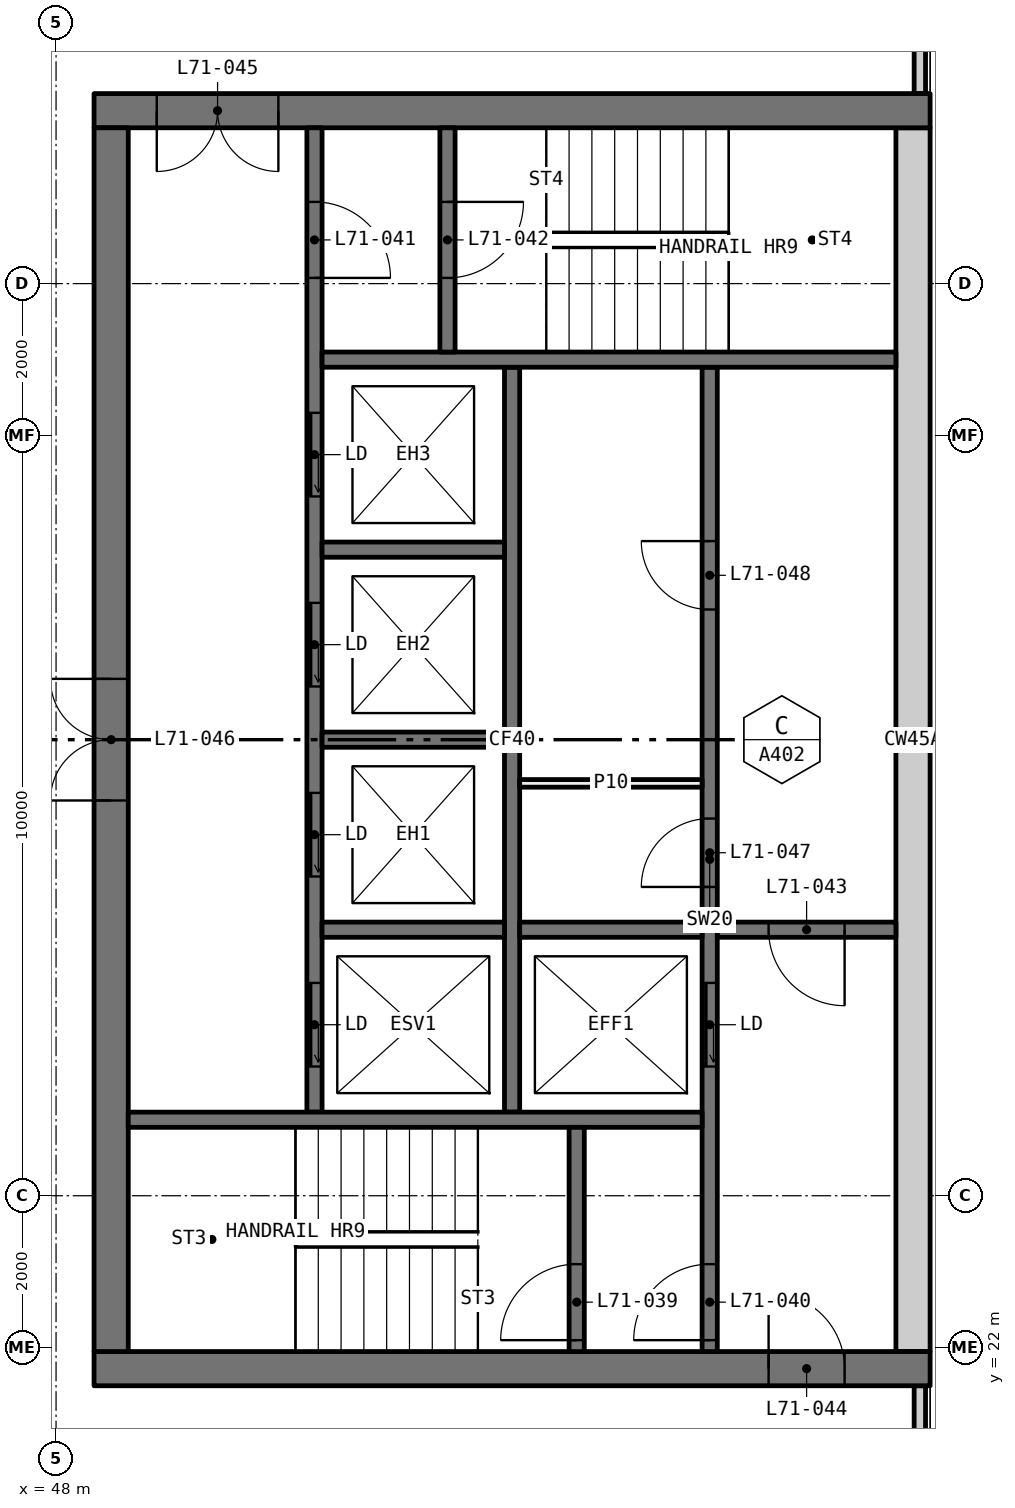
"""IFC4 building model, lengths in metres.
Left out: names, types, materials, properties, quantities, classifications, styles, units other than length and angle.
Written with IfcOpenShell. Run it as: python <this file> out.ifc"""

import sys

from ifc_helpers import new_model, si_unit, direction, frame, frame_2d, origin, place, context, subcontext, project, spatial, rectangle, extrude, element, fill, save


model = new_model("IFC4")
c1 = context("Model", 3, precision=1e-05, world=origin(), true_north=direction((0.0, 1.0)))
c2 = subcontext(c1, "Body", "Model", "MODEL_VIEW")
j1 = project(units=[si_unit("LENGTHUNIT", "METRE"), si_unit("PLANEANGLEUNIT", "RADIAN")], contexts=[c1])
p1 = place(None, origin())
s1 = spatial("IfcSite", under=j1, at=p1, CompositionType="ELEMENT")
p2 = place(p1, origin())
s2 = spatial("IfcBuilding", under=s1, at=p2, CompositionType="ELEMENT")
p3 = place(p2, frame((0.0, 0.0, 262.8)))
s3 = spatial("IfcBuildingStorey", under=s2, at=p3, CompositionType="ELEMENT", Elevation=262.8)
for number, where, z_axis, x_axis in (
    (1, (59.365, 18.71, 0.0), (0.0, 0.0, 1.0), (0.0, 1.0, 0.0)),
    (2, (59.365, 38.5, 0.0), (0.0, 0.0, 1.0), (0.0, 1.0, 0.0)),
):
    element("IfcWall", number, at=place(p3, frame(where, z_axis=z_axis, x_axis=x_axis)), inside=s3, PredefinedType="ELEMENTEDWALL", context=c2, shape_type="SweptSolid", body=[
        extrude(rectangle(XDim=2.79, YDim=0.15, at=frame_2d((1.395, 0.0))), origin(), (0.0, 0.0, 1.0), 3.05),
    ])
p4 = place(p3, frame((59.5, 21.725, 0.0), z_axis=(0.0, 0.0, 1.0), x_axis=(-1.0, 0.0, 0.0)))
e3 = element("IfcWall", 3, at=p4, inside=s3, PredefinedType="SHEAR", context=c2, shape_type="SweptSolid", body=[
    extrude(rectangle(XDim=11.0, YDim=0.45, at=frame_2d((5.5, 0.0))), origin(), (0.0, 0.0, 1.0), 3.05),
])
p5 = place(p4, frame((1.125, 0.0, 0.0)))
e4 = element("IfcOpeningElement", 4, at=p5, cuts=e3, PredefinedType="OPENING", context=c2, shape_type="SweptSolid", body=[
    extrude(rectangle(XDim=1.0, YDim=2.1, at=frame_2d((0.5, 1.05))), frame((0.0, 0.235, 0.0), z_axis=(0.0, -1.0, 0.0), x_axis=(1.0, 0.0, 0.0)), (0.0, 0.0, 1.0), 0.47),
])
p6 = place(p3, frame((59.5, 38.275, 0.0), z_axis=(0.0, 0.0, 1.0), x_axis=(-1.0, 0.0, 0.0)))
e5 = element("IfcWall", 5, at=p6, inside=s3, PredefinedType="SHEAR", context=c2, shape_type="SweptSolid", body=[
    extrude(rectangle(XDim=11.0, YDim=0.45, at=frame_2d((5.5, 0.0))), origin(), (0.0, 0.0, 1.0), 3.05),
])
p7 = place(p6, frame((8.575, 0.0, 0.0)))
e6 = element("IfcOpeningElement", 6, at=p7, cuts=e5, PredefinedType="OPENING", context=c2, shape_type="SweptSolid", body=[
    extrude(rectangle(XDim=1.6, YDim=2.1, at=frame_2d((0.8, 1.05))), frame((0.0, 0.235, 0.0), z_axis=(0.0, -1.0, 0.0), x_axis=(1.0, 0.0, 0.0)), (0.0, 0.0, 1.0), 0.47),
])
p8 = place(p3, frame((59.275, 21.95, 0.0), z_axis=(0.0, 0.0, 1.0), x_axis=(0.0, 1.0, 0.0)))
e7 = element("IfcWall", 7, at=p8, inside=s3, PredefinedType="SHEAR", context=c2, shape_type="SweptSolid", body=[
    extrude(rectangle(XDim=16.1, YDim=0.45, at=frame_2d((8.05, 0.0))), origin(), (0.0, 0.0, 1.0), 3.05),
])
p9 = place(p3, frame((48.725, 21.95, 0.0), z_axis=(0.0, 0.0, 1.0), x_axis=(0.0, 1.0, 0.0)))
e8 = element("IfcWall", 8, at=p9, inside=s3, PredefinedType="SHEAR", context=c2, shape_type="SweptSolid", body=[
    extrude(rectangle(XDim=16.1, YDim=0.45, at=frame_2d((8.05, 0.0))), origin(), (0.0, 0.0, 1.0), 3.05),
])
p10 = place(p9, frame((7.25, 0.0, 0.0)))
e9 = element("IfcOpeningElement", 9, at=p10, cuts=e8, PredefinedType="OPENING", context=c2, shape_type="SweptSolid", body=[
    extrude(rectangle(XDim=1.6, YDim=2.1, at=frame_2d((0.8, 1.05))), frame((0.0, 0.235, 0.0), z_axis=(0.0, -1.0, 0.0), x_axis=(1.0, 0.0, 0.0)), (0.0, 0.0, 1.0), 0.47),
])
p11 = place(p3, frame((56.6, 21.95, 0.0), z_axis=(0.0, 0.0, 1.0), x_axis=(0.0, 1.0, 0.0)))
e10 = element("IfcWall", 10, at=p11, inside=s3, PredefinedType="SOLIDWALL", context=c2, shape_type="SweptSolid", body=[
    extrude(rectangle(XDim=12.95, YDim=0.2, at=frame_2d((6.475, 0.0))), origin(), (0.0, 0.0, 1.0), 3.05),
])
p12 = place(p11, frame((3.75, 0.0, 0.0)))
e11 = element("IfcOpeningElement", 11, at=p12, cuts=e10, PredefinedType="OPENING", context=c2, shape_type="SweptSolid", body=[
    extrude(rectangle(XDim=1.1, YDim=2.1, at=frame_2d((0.55, 1.05))), frame((0.0, 0.11, 0.0), z_axis=(0.0, -1.0, 0.0), x_axis=(1.0, 0.0, 0.0)), (0.0, 0.0, 1.0), 0.22),
])
p13 = place(p11, frame((0.15, 0.0, 0.0)))
e12 = element("IfcOpeningElement", 12, at=p13, cuts=e10, PredefinedType="OPENING", context=c2, shape_type="SweptSolid", body=[
    extrude(rectangle(XDim=1.0, YDim=2.1, at=frame_2d((0.5, 1.05))), frame((0.0, 0.11, 0.0), z_axis=(0.0, -1.0, 0.0), x_axis=(1.0, 0.0, 0.0)), (0.0, 0.0, 1.0), 0.22),
])
p14 = place(p11, frame((6.113, 0.0, 0.0)))
e13 = element("IfcOpeningElement", 13, at=p14, cuts=e10, PredefinedType="OPENING", context=c2, shape_type="SweptSolid", body=[
    extrude(rectangle(XDim=0.9, YDim=2.1, at=frame_2d((0.45, 1.05))), frame((0.0, 0.11, 0.0), z_axis=(0.0, -1.0, 0.0), x_axis=(1.0, 0.0, 0.0)), (0.0, 0.0, 1.0), 0.22),
])
p15 = place(p11, frame((9.762, 0.0, 0.0)))
e14 = element("IfcOpeningElement", 14, at=p15, cuts=e10, PredefinedType="OPENING", context=c2, shape_type="SweptSolid", body=[
    extrude(rectangle(XDim=0.9, YDim=2.1, at=frame_2d((0.45, 1.05))), frame((0.0, 0.11, 0.0), z_axis=(0.0, -1.0, 0.0), x_axis=(1.0, 0.0, 0.0)), (0.0, 0.0, 1.0), 0.22),
])
p16 = place(p3, frame((51.4, 25.1, 0.0), z_axis=(0.0, 0.0, 1.0), x_axis=(0.0, 1.0, 0.0)))
e15 = element("IfcWall", 15, at=p16, inside=s3, PredefinedType="SOLIDWALL", context=c2, shape_type="SweptSolid", body=[
    extrude(rectangle(XDim=12.95, YDim=0.2, at=frame_2d((6.475, 0.0))), origin(), (0.0, 0.0, 1.0), 3.05),
])
p17 = place(p16, frame((0.6, 0.0, 0.0)))
e16 = element("IfcOpeningElement", 16, at=p17, cuts=e15, PredefinedType="OPENING", context=c2, shape_type="SweptSolid", body=[
    extrude(rectangle(XDim=1.1, YDim=2.1, at=frame_2d((0.55, 1.05))), frame((0.0, 0.11, 0.0), z_axis=(0.0, -1.0, 0.0), x_axis=(1.0, 0.0, 0.0)), (0.0, 0.0, 1.0), 0.22),
])
p18 = place(p16, frame((3.1, 0.0, 0.0)))
e17 = element("IfcOpeningElement", 17, at=p18, cuts=e15, PredefinedType="OPENING", context=c2, shape_type="SweptSolid", body=[
    extrude(rectangle(XDim=1.1, YDim=2.1, at=frame_2d((0.55, 1.05))), frame((0.0, 0.11, 0.0), z_axis=(0.0, -1.0, 0.0), x_axis=(1.0, 0.0, 0.0)), (0.0, 0.0, 1.0), 0.22),
])
p19 = place(p16, frame((5.6, 0.0, 0.0)))
e18 = element("IfcOpeningElement", 18, at=p19, cuts=e15, PredefinedType="OPENING", context=c2, shape_type="SweptSolid", body=[
    extrude(rectangle(XDim=1.1, YDim=2.1, at=frame_2d((0.55, 1.05))), frame((0.0, 0.11, 0.0), z_axis=(0.0, -1.0, 0.0), x_axis=(1.0, 0.0, 0.0)), (0.0, 0.0, 1.0), 0.22),
])
p20 = place(p16, frame((8.1, 0.0, 0.0)))
e19 = element("IfcOpeningElement", 19, at=p20, cuts=e15, PredefinedType="OPENING", context=c2, shape_type="SweptSolid", body=[
    extrude(rectangle(XDim=1.1, YDim=2.1, at=frame_2d((0.55, 1.05))), frame((0.0, 0.11, 0.0), z_axis=(0.0, -1.0, 0.0), x_axis=(1.0, 0.0, 0.0)), (0.0, 0.0, 1.0), 0.22),
])
p21 = place(p16, frame((10.975, 0.0, 0.0)))
e20 = element("IfcOpeningElement", 20, at=p21, cuts=e15, PredefinedType="OPENING", context=c2, shape_type="SweptSolid", body=[
    extrude(rectangle(XDim=1.0, YDim=2.1, at=frame_2d((0.5, 1.05))), frame((0.0, 0.11, 0.0), z_axis=(0.0, -1.0, 0.0), x_axis=(1.0, 0.0, 0.0)), (0.0, 0.0, 1.0), 0.22),
])
p22 = place(p3, frame((54.0, 25.1, 0.0), z_axis=(0.0, 0.0, 1.0), x_axis=(0.0, 1.0, 0.0)))
e21 = element("IfcWall", 21, at=p22, inside=s3, PredefinedType="SOLIDWALL", context=c2, shape_type="SweptSolid", body=[
    extrude(rectangle(XDim=9.8, YDim=0.2, at=frame_2d((4.9, 0.0))), origin(), (0.0, 0.0, 1.0), 3.05),
])
for number, where, z_axis, x_axis in (
    (22, (56.5, 25.0, 0.0), (0.0, 0.0, 1.0), (-1.0, 0.0, 0.0)),
    (23, (59.05, 35.0, 0.0), (0.0, 0.0, 1.0), (-1.0, 0.0, 0.0)),
):
    element("IfcWall", number, at=place(p3, frame(where, z_axis=z_axis, x_axis=x_axis)), inside=s3, PredefinedType="SOLIDWALL", context=c2, shape_type="SweptSolid", body=[
        extrude(rectangle(XDim=7.55, YDim=0.2, at=frame_2d((3.775, 0.0))), origin(), (0.0, 0.0, 1.0), 3.05),
    ])
p23 = place(p3, frame((59.05, 27.5, 0.0), z_axis=(0.0, 0.0, 1.0), x_axis=(-1.0, 0.0, 0.0)))
e24 = element("IfcWall", 24, at=p23, inside=s3, PredefinedType="SOLIDWALL", context=c2, shape_type="SweptSolid", body=[
    extrude(rectangle(XDim=2.35, YDim=0.2, at=frame_2d((1.175, 0.0))), origin(), (0.0, 0.0, 1.0), 3.05),
])
p24 = place(p23, frame((0.675, 0.0, 0.0)))
e25 = element("IfcOpeningElement", 25, at=p24, cuts=e24, PredefinedType="OPENING", context=c2, shape_type="SweptSolid", body=[
    extrude(rectangle(XDim=1.0, YDim=2.1, at=frame_2d((0.5, 1.05))), frame((0.0, 0.11, 0.0), z_axis=(0.0, -1.0, 0.0), x_axis=(1.0, 0.0, 0.0)), (0.0, 0.0, 1.0), 0.22),
])
p25 = place(p3, frame((54.85, 21.95, 0.0), z_axis=(0.0, 0.0, 1.0), x_axis=(0.0, 1.0, 0.0)))
e26 = element("IfcWall", 26, at=p25, inside=s3, PredefinedType="SOLIDWALL", context=c2, shape_type="SweptSolid", body=[
    extrude(rectangle(XDim=2.95, YDim=0.2, at=frame_2d((1.475, 0.0))), origin(), (0.0, 0.0, 1.0), 3.05),
])
p26 = place(p25, frame((0.15, 0.0, 0.0)))
e27 = element("IfcOpeningElement", 27, at=p26, cuts=e26, PredefinedType="OPENING", context=c2, shape_type="SweptSolid", body=[
    extrude(rectangle(XDim=1.0, YDim=2.1, at=frame_2d((0.5, 1.05))), frame((0.0, 0.11, 0.0), z_axis=(0.0, -1.0, 0.0), x_axis=(1.0, 0.0, 0.0)), (0.0, 0.0, 1.0), 0.22),
])
p27 = place(p3, frame((53.15, 35.1, 0.0), z_axis=(0.0, 0.0, 1.0), x_axis=(0.0, 1.0, 0.0)))
e28 = element("IfcWall", 28, at=p27, inside=s3, PredefinedType="SOLIDWALL", context=c2, shape_type="SweptSolid", body=[
    extrude(rectangle(XDim=2.95, YDim=0.2, at=frame_2d((1.475, 0.0))), origin(), (0.0, 0.0, 1.0), 3.05),
])
p28 = place(p27, frame((0.975, 0.0, 0.0)))
e29 = element("IfcOpeningElement", 29, at=p28, cuts=e28, PredefinedType="OPENING", context=c2, shape_type="SweptSolid", body=[
    extrude(rectangle(XDim=1.0, YDim=2.1, at=frame_2d((0.5, 1.05))), frame((0.0, 0.11, 0.0), z_axis=(0.0, -1.0, 0.0), x_axis=(1.0, 0.0, 0.0)), (0.0, 0.0, 1.0), 0.22),
])
for number, where, z_axis, x_axis in (
    (30, (56.5, 27.5, 0.0), (0.0, 0.0, 1.0), (-1.0, 0.0, 0.0)),
    (31, (53.9, 27.5, 0.0), (0.0, 0.0, 1.0), (-1.0, 0.0, 0.0)),
    (32, (53.9, 30.0, 0.0), (0.0, 0.0, 1.0), (-1.0, 0.0, 0.0)),
    (33, (53.9, 32.5, 0.0), (0.0, 0.0, 1.0), (-1.0, 0.0, 0.0)),
):
    element("IfcWall", number, at=place(p3, frame(where, z_axis=z_axis, x_axis=x_axis)), inside=s3, PredefinedType="SOLIDWALL", context=c2, shape_type="SweptSolid", body=[
        extrude(rectangle(XDim=2.4, YDim=0.2, at=frame_2d((1.2, 0.0))), origin(), (0.0, 0.0, 1.0), 3.05),
    ])
p29 = place(p3, frame((56.5, 29.425, 0.0), z_axis=(0.0, 0.0, 1.0), x_axis=(-1.0, 0.0, 0.0)))
e34 = element("IfcWall", 34, at=p29, inside=s3, PredefinedType="PARTITIONING", context=c2, shape_type="SweptSolid", body=[
    extrude(rectangle(XDim=2.4, YDim=0.1, at=frame_2d((1.2, 0.0))), origin(), (0.0, 0.0, 1.0), 3.05),
])
p30 = place(p17, origin())
e35 = element("IfcDoor", 35, at=p30, inside=s3, OperationType="SLIDING_TO_LEFT", PredefinedType="DOOR", context=c2, shape_type="SweptSolid", body=[
    extrude(rectangle(XDim=1.1, YDim=2.1, at=frame_2d((0.55, 1.05))), frame((0.0, 0.025, 0.0), z_axis=(0.0, -1.0, 0.0), x_axis=(1.0, 0.0, 0.0)), (0.0, 0.0, 1.0), 0.05),
])
fill(e16, e35)
p31 = place(p18, origin())
e36 = element("IfcDoor", 36, at=p31, inside=s3, OperationType="SLIDING_TO_LEFT", PredefinedType="DOOR", context=c2, shape_type="SweptSolid", body=[
    extrude(rectangle(XDim=1.1, YDim=2.1, at=frame_2d((0.55, 1.05))), frame((0.0, 0.025, 0.0), z_axis=(0.0, -1.0, 0.0), x_axis=(1.0, 0.0, 0.0)), (0.0, 0.0, 1.0), 0.05),
])
fill(e17, e36)
p32 = place(p19, origin())
e37 = element("IfcDoor", 37, at=p32, inside=s3, OperationType="SLIDING_TO_LEFT", PredefinedType="DOOR", context=c2, shape_type="SweptSolid", body=[
    extrude(rectangle(XDim=1.1, YDim=2.1, at=frame_2d((0.55, 1.05))), frame((0.0, 0.025, 0.0), z_axis=(0.0, -1.0, 0.0), x_axis=(1.0, 0.0, 0.0)), (0.0, 0.0, 1.0), 0.05),
])
fill(e18, e37)
p33 = place(p20, origin())
e38 = element("IfcDoor", 38, at=p33, inside=s3, OperationType="SLIDING_TO_LEFT", PredefinedType="DOOR", context=c2, shape_type="SweptSolid", body=[
    extrude(rectangle(XDim=1.1, YDim=2.1, at=frame_2d((0.55, 1.05))), frame((0.0, 0.025, 0.0), z_axis=(0.0, -1.0, 0.0), x_axis=(1.0, 0.0, 0.0)), (0.0, 0.0, 1.0), 0.05),
])
fill(e19, e38)
p34 = place(p12, origin())
e39 = element("IfcDoor", 39, at=p34, inside=s3, OperationType="SLIDING_TO_LEFT", PredefinedType="DOOR", context=c2, shape_type="SweptSolid", body=[
    extrude(rectangle(XDim=1.1, YDim=2.1, at=frame_2d((0.55, 1.05))), frame((0.0, 0.025, 0.0), z_axis=(0.0, -1.0, 0.0), x_axis=(1.0, 0.0, 0.0)), (0.0, 0.0, 1.0), 0.05),
])
fill(e11, e39)
p35 = place(p26, origin())
e40 = element("IfcDoor", 40, at=p35, inside=s3, OperationType="SINGLE_SWING_RIGHT", PredefinedType="DOOR", context=c2, shape_type="SweptSolid", body=[
    extrude(rectangle(XDim=1.0, YDim=2.1, at=frame_2d((0.5, 1.05))), frame((0.0, 0.025, 0.0), z_axis=(0.0, -1.0, 0.0), x_axis=(1.0, 0.0, 0.0)), (0.0, 0.0, 1.0), 0.05),
])
fill(e27, e40)
p36 = place(p13, origin())
e41 = element("IfcDoor", 41, at=p36, inside=s3, OperationType="SINGLE_SWING_RIGHT", PredefinedType="DOOR", context=c2, shape_type="SweptSolid", body=[
    extrude(rectangle(XDim=1.0, YDim=2.1, at=frame_2d((0.5, 1.05))), frame((0.0, 0.025, 0.0), z_axis=(0.0, -1.0, 0.0), x_axis=(1.0, 0.0, 0.0)), (0.0, 0.0, 1.0), 0.05),
])
fill(e12, e41)
p37 = place(p21, frame((1.0, 0.0, 0.0), x_axis=(-1.0, 0.0, 0.0)))
e42 = element("IfcDoor", 42, at=p37, inside=s3, OperationType="SINGLE_SWING_LEFT", PredefinedType="DOOR", context=c2, shape_type="SweptSolid", body=[
    extrude(rectangle(XDim=1.0, YDim=2.1, at=frame_2d((0.5, 1.05))), frame((0.0, 0.025, 0.0), z_axis=(0.0, -1.0, 0.0), x_axis=(1.0, 0.0, 0.0)), (0.0, 0.0, 1.0), 0.05),
])
fill(e20, e42)
p38 = place(p28, frame((1.0, 0.0, 0.0), x_axis=(-1.0, 0.0, 0.0)))
e43 = element("IfcDoor", 43, at=p38, inside=s3, OperationType="SINGLE_SWING_RIGHT", PredefinedType="DOOR", context=c2, shape_type="SweptSolid", body=[
    extrude(rectangle(XDim=1.0, YDim=2.1, at=frame_2d((0.5, 1.05))), frame((0.0, 0.025, 0.0), z_axis=(0.0, -1.0, 0.0), x_axis=(1.0, 0.0, 0.0)), (0.0, 0.0, 1.0), 0.05),
])
fill(e29, e43)
p39 = place(p24, origin())
e44 = element("IfcDoor", 44, at=p39, inside=s3, OperationType="SINGLE_SWING_RIGHT", PredefinedType="DOOR", context=c2, shape_type="SweptSolid", body=[
    extrude(rectangle(XDim=1.0, YDim=2.1, at=frame_2d((0.5, 1.05))), frame((0.0, 0.025, 0.0), z_axis=(0.0, -1.0, 0.0), x_axis=(1.0, 0.0, 0.0)), (0.0, 0.0, 1.0), 0.05),
])
fill(e25, e44)
p40 = place(p5, frame((1.0, 0.0, 0.0), x_axis=(-1.0, 0.0, 0.0)))
e45 = element("IfcDoor", 45, at=p40, inside=s3, OperationType="SINGLE_SWING_RIGHT", PredefinedType="DOOR", context=c2, shape_type="SweptSolid", body=[
    extrude(rectangle(XDim=1.0, YDim=2.1, at=frame_2d((0.5, 1.05))), frame((0.0, 0.025, 0.0), z_axis=(0.0, -1.0, 0.0), x_axis=(1.0, 0.0, 0.0)), (0.0, 0.0, 1.0), 0.05),
])
fill(e4, e45)
p41 = place(p7, origin())
e46 = element("IfcDoor", 46, at=p41, inside=s3, OperationType="DOUBLE_DOOR_SINGLE_SWING", PredefinedType="DOOR", context=c2, shape_type="SweptSolid", body=[
    extrude(rectangle(XDim=1.6, YDim=2.1, at=frame_2d((0.8, 1.05))), frame((0.0, 0.025, 0.0), z_axis=(0.0, -1.0, 0.0), x_axis=(1.0, 0.0, 0.0)), (0.0, 0.0, 1.0), 0.05),
])
fill(e6, e46)
p42 = place(p10, origin())
e47 = element("IfcDoor", 47, at=p42, inside=s3, OperationType="DOUBLE_DOOR_SINGLE_SWING", PredefinedType="DOOR", context=c2, shape_type="SweptSolid", body=[
    extrude(rectangle(XDim=1.6, YDim=2.1, at=frame_2d((0.8, 1.05))), frame((0.0, 0.025, 0.0), z_axis=(0.0, -1.0, 0.0), x_axis=(1.0, 0.0, 0.0)), (0.0, 0.0, 1.0), 0.05),
])
fill(e9, e47)
p43 = place(p14, origin())
e48 = element("IfcDoor", 48, at=p43, inside=s3, OperationType="SINGLE_SWING_RIGHT", PredefinedType="DOOR", context=c2, shape_type="SweptSolid", body=[
    extrude(rectangle(XDim=0.9, YDim=2.1, at=frame_2d((0.45, 1.05))), frame((0.0, 0.025, 0.0), z_axis=(0.0, -1.0, 0.0), x_axis=(1.0, 0.0, 0.0)), (0.0, 0.0, 1.0), 0.05),
])
fill(e13, e48)
p44 = place(p15, origin())
e49 = element("IfcDoor", 49, at=p44, inside=s3, OperationType="SINGLE_SWING_LEFT", PredefinedType="DOOR", context=c2, shape_type="SweptSolid", body=[
    extrude(rectangle(XDim=0.9, YDim=2.1, at=frame_2d((0.45, 1.05))), frame((0.0, 0.025, 0.0), z_axis=(0.0, -1.0, 0.0), x_axis=(1.0, 0.0, 0.0)), (0.0, 0.0, 1.0), 0.05),
])
fill(e14, e49)
save(model, sys.argv[1])
